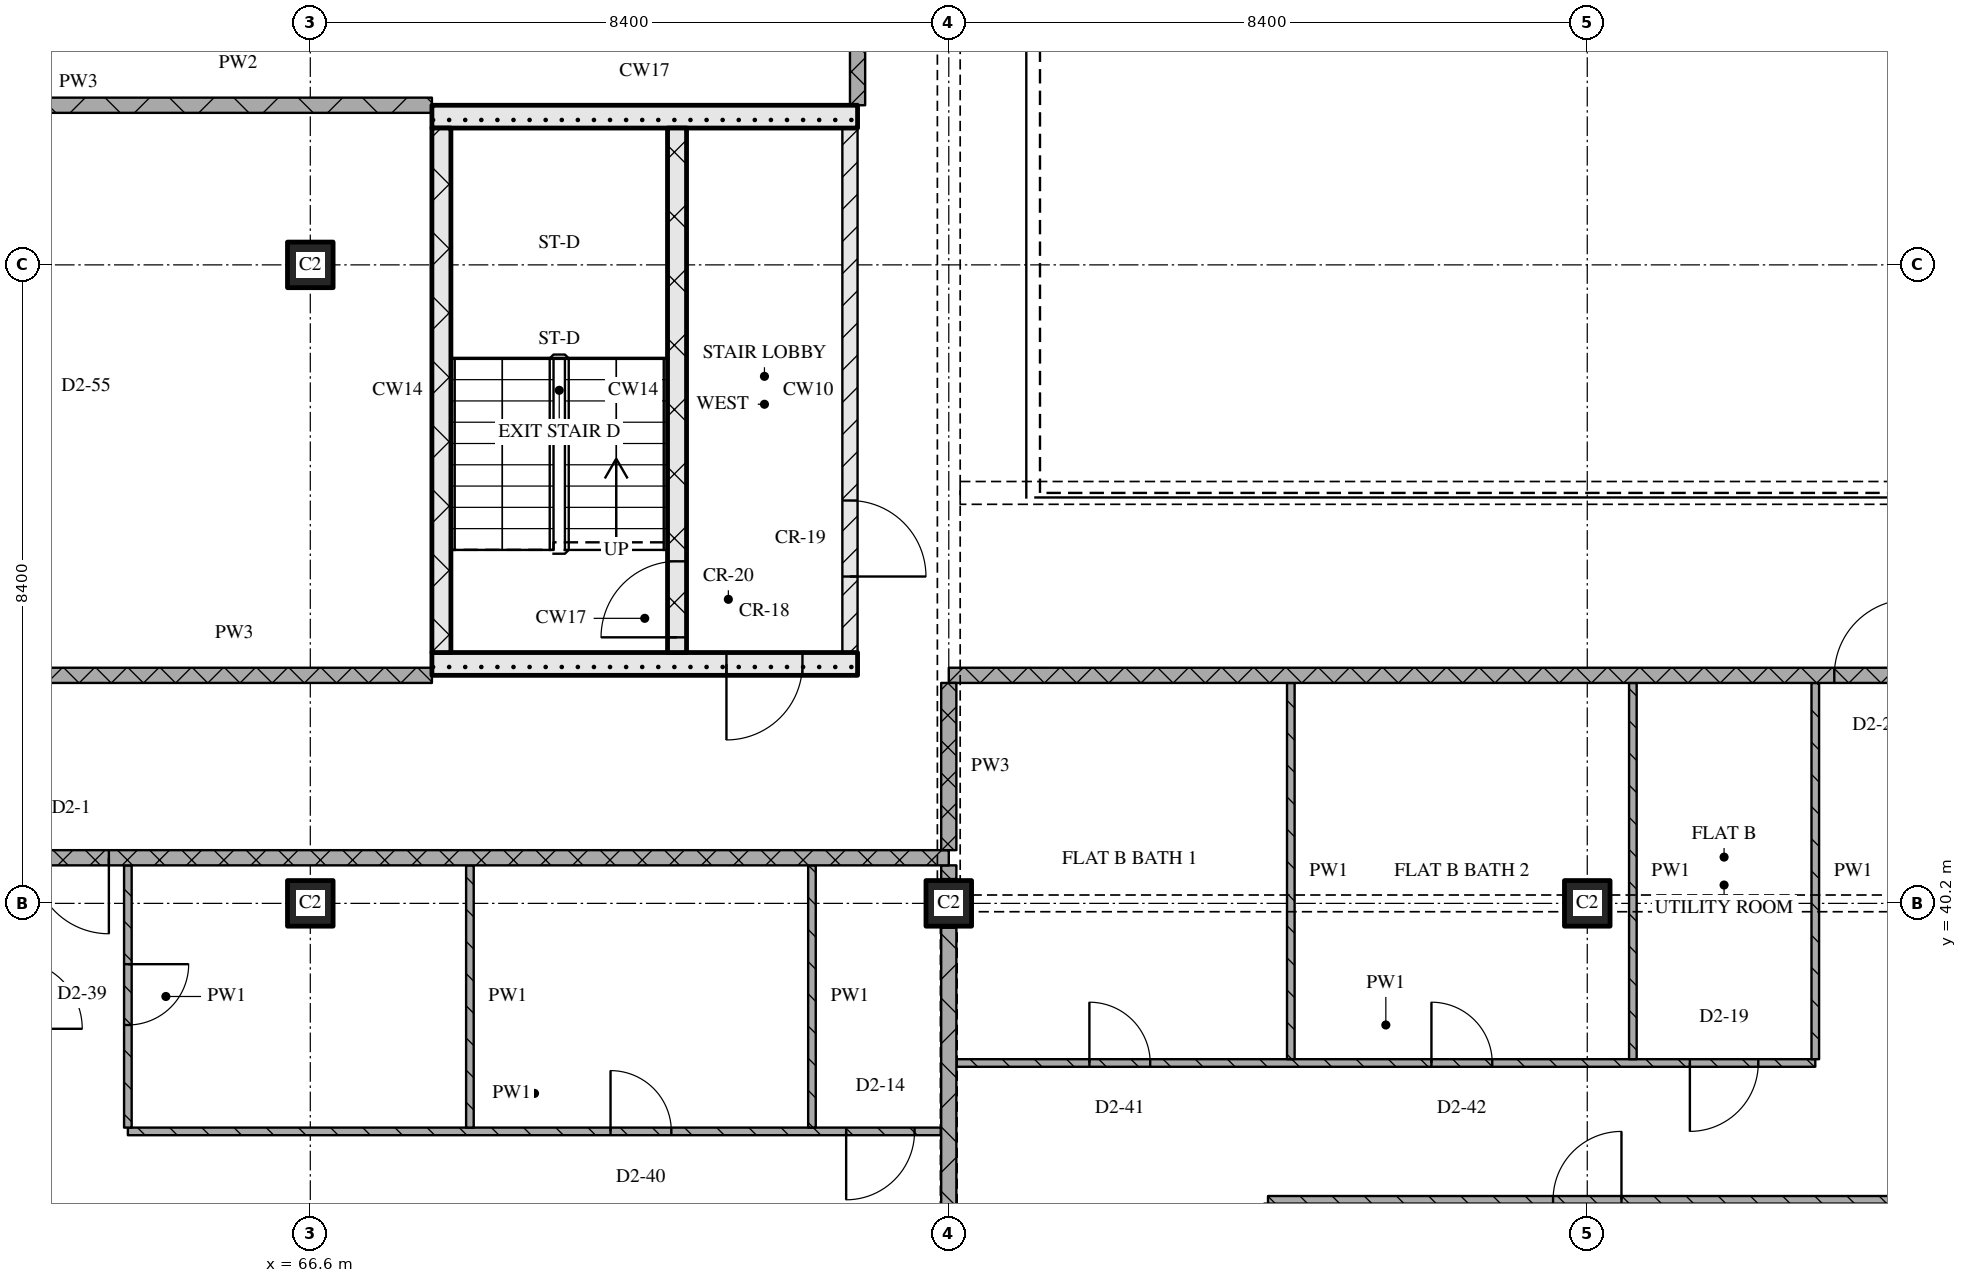
"""IFC4 building model, lengths in metres.
Left out: names, types, materials, properties, quantities, classifications, styles, units other than length and angle.
Written with IfcOpenShell. Run it as: python <this file> out.ifc"""

import sys

from ifc_helpers import new_model, si_unit, direction, frame, frame_2d, origin, origin_2d, place, context, subcontext, project, spatial, rectangle, extrude, element, fill, save


model = new_model("IFC4")
c1 = context("Model", 3, precision=1e-05, world=origin(), true_north=direction((0.0, 1.0)))
c2 = subcontext(c1, "Body", "Model", "MODEL_VIEW")
j1 = project(units=[si_unit("LENGTHUNIT", "METRE"), si_unit("PLANEANGLEUNIT", "RADIAN")], contexts=[c1])
p1 = place(None, origin())
s1 = spatial("IfcSite", under=j1, at=p1, CompositionType="ELEMENT")
p2 = place(p1, origin())
s2 = spatial("IfcBuilding", under=s1, at=p2, CompositionType="ELEMENT")
p3 = place(p2, frame((0.0, 0.0, 216.3)))
s3 = spatial("IfcBuildingStorey", under=s2, at=p3, CompositionType="ELEMENT", Elevation=216.3)
for number, where, z_axis, x_axis in (
    (1, (66.6, 40.2, 0.0), (0.0, 0.0, 1.0), (1.0, 0.0, 0.0)),
    (2, (66.6, 48.6, 0.0), (0.0, 0.0, 1.0), (1.0, 0.0, 0.0)),
    (3, (75.0, 40.2, 0.0), (0.0, 0.0, 1.0), (1.0, 0.0, 0.0)),
    (4, (83.4, 40.2, 0.0), (0.0, 0.0, 1.0), (1.0, 0.0, 0.0)),
):
    element("IfcColumn", number, at=place(p3, frame(where, z_axis=z_axis, x_axis=x_axis)), inside=s3, PredefinedType="COLUMN", context=c2, shape_type="SweptSolid", body=[
        extrude(rectangle(XDim=0.6, YDim=0.6, at=origin_2d()), origin(), (0.0, 0.0, 1.0), 3.6),
    ])
p4 = place(p3, frame((68.2, 43.35, 0.0), z_axis=(0.0, 0.0, 1.0), x_axis=(1.0, 0.0, 0.0)))
e5 = element("IfcWall", 5, at=p4, inside=s3, PredefinedType="SOLIDWALL", context=c2, shape_type="SweptSolid", body=[
    extrude(rectangle(XDim=5.6, YDim=0.3, at=frame_2d((2.8, 0.0))), origin(), (0.0, 0.0, 1.0), 3.32),
])
p5 = place(p4, frame((3.875, 0.0, 0.0)))
e6 = element("IfcOpeningElement", 6, at=p5, cuts=e5, PredefinedType="OPENING", context=c2, shape_type="SweptSolid", body=[
    extrude(rectangle(XDim=1.0, YDim=2.1, at=frame_2d((0.5, 1.05))), frame((0.0, 0.16, 0.0), z_axis=(0.0, -1.0, 0.0), x_axis=(1.0, 0.0, 0.0)), (0.0, 0.0, 1.0), 0.32),
])
p6 = place(p3, frame((68.325, 43.5, 0.0), z_axis=(0.0, 0.0, 1.0), x_axis=(0.0, 1.0, 0.0)))
e7 = element("IfcWall", 7, at=p6, inside=s3, PredefinedType="SOLIDWALL", context=c2, shape_type="SweptSolid", body=[
    extrude(rectangle(XDim=6.9, YDim=0.25, at=frame_2d((3.45, 0.0))), origin(), (0.0, 0.0, 1.0), 3.32),
])
p7 = place(p3, frame((71.425, 43.5, 0.0), z_axis=(0.0, 0.0, 1.0), x_axis=(0.0, 1.0, 0.0)))
e8 = element("IfcWall", 8, at=p7, inside=s3, PredefinedType="SOLIDWALL", context=c2, shape_type="SweptSolid", body=[
    extrude(rectangle(XDim=6.9, YDim=0.25, at=frame_2d((3.45, 0.0))), origin(), (0.0, 0.0, 1.0), 3.32),
])
p8 = place(p7, frame((0.2, 0.0, 0.0)))
e9 = element("IfcOpeningElement", 9, at=p8, cuts=e8, PredefinedType="OPENING", context=c2, shape_type="SweptSolid", body=[
    extrude(rectangle(XDim=1.0, YDim=2.1, at=frame_2d((0.5, 1.05))), frame((0.0, 0.135, 0.0), z_axis=(0.0, -1.0, 0.0), x_axis=(1.0, 0.0, 0.0)), (0.0, 0.0, 1.0), 0.27),
])
p9 = place(p3, frame((73.7, 43.5, 0.0), z_axis=(0.0, 0.0, 1.0), x_axis=(0.0, 1.0, 0.0)))
e10 = element("IfcWall", 10, at=p9, inside=s3, PredefinedType="PARTITIONING", context=c2, shape_type="SweptSolid", body=[
    extrude(rectangle(XDim=6.9, YDim=0.2, at=frame_2d((3.45, 0.0))), origin(), (0.0, 0.0, 1.0), 3.32),
])
p10 = place(p9, frame((1.0, 0.0, 0.0)))
e11 = element("IfcOpeningElement", 11, at=p10, cuts=e10, PredefinedType="OPENING", context=c2, shape_type="SweptSolid", body=[
    extrude(rectangle(XDim=1.0, YDim=2.1, at=frame_2d((0.5, 1.05))), frame((0.0, 0.11, 0.0), z_axis=(0.0, -1.0, 0.0), x_axis=(1.0, 0.0, 0.0)), (0.0, 0.0, 1.0), 0.22),
])
p11 = place(p3, frame((68.2, 50.55, 0.0), z_axis=(0.0, 0.0, 1.0), x_axis=(1.0, 0.0, 0.0)))
e12 = element("IfcWall", 12, at=p11, inside=s3, PredefinedType="SOLIDWALL", context=c2, shape_type="SweptSolid", body=[
    extrude(rectangle(XDim=5.6, YDim=0.3, at=frame_2d((2.8, 0.0))), origin(), (0.0, 0.0, 1.0), 3.32),
])
p12 = place(p3, frame((64.2, 37.2, 0.0), z_axis=(0.0, 0.0, 1.0), x_axis=(1.0, 0.0, 0.0)))
e13 = element("IfcWall", 13, at=p12, inside=s3, PredefinedType="PARTITIONING", context=c2, shape_type="SweptSolid", body=[
    extrude(rectangle(XDim=10.7, YDim=0.1, at=frame_2d((5.35, 0.0))), origin(), (0.0, 0.0, 1.0), 3.32),
])
p13 = place(p12, frame((6.35, 0.0, 0.0)))
e14 = element("IfcOpeningElement", 14, at=p13, cuts=e13, PredefinedType="OPENING", context=c2, shape_type="SweptSolid", body=[
    extrude(rectangle(XDim=0.8, YDim=2.1, at=frame_2d((0.4, 1.05))), frame((0.0, 0.06, 0.0), z_axis=(0.0, -1.0, 0.0), x_axis=(1.0, 0.0, 0.0)), (0.0, 0.0, 1.0), 0.12),
])
p14 = place(p12, frame((9.45, 0.0, 0.0)))
e15 = element("IfcOpeningElement", 15, at=p14, cuts=e13, PredefinedType="OPENING", context=c2, shape_type="SweptSolid", body=[
    extrude(rectangle(XDim=0.9, YDim=2.1, at=frame_2d((0.45, 1.05))), frame((0.0, 0.06, 0.0), z_axis=(0.0, -1.0, 0.0), x_axis=(1.0, 0.0, 0.0)), (0.0, 0.0, 1.0), 0.12),
])
p15 = place(p3, frame((75.1, 38.1, 0.0), z_axis=(0.0, 0.0, 1.0), x_axis=(1.0, 0.0, 0.0)))
e16 = element("IfcWall", 16, at=p15, inside=s3, PredefinedType="PARTITIONING", context=c2, shape_type="SweptSolid", body=[
    extrude(rectangle(XDim=11.3, YDim=0.1, at=frame_2d((5.65, 0.0))), origin(), (0.0, 0.0, 1.0), 3.32),
])
p16 = place(p15, frame((1.75, 0.0, 0.0)))
e17 = element("IfcOpeningElement", 17, at=p16, cuts=e16, PredefinedType="OPENING", context=c2, shape_type="SweptSolid", body=[
    extrude(rectangle(XDim=0.8, YDim=2.1, at=frame_2d((0.4, 1.05))), frame((0.0, 0.06, 0.0), z_axis=(0.0, -1.0, 0.0), x_axis=(1.0, 0.0, 0.0)), (0.0, 0.0, 1.0), 0.12),
])
p17 = place(p15, frame((6.25, 0.0, 0.0)))
e18 = element("IfcOpeningElement", 18, at=p17, cuts=e16, PredefinedType="OPENING", context=c2, shape_type="SweptSolid", body=[
    extrude(rectangle(XDim=0.8, YDim=2.1, at=frame_2d((0.4, 1.05))), frame((0.0, 0.06, 0.0), z_axis=(0.0, -1.0, 0.0), x_axis=(1.0, 0.0, 0.0)), (0.0, 0.0, 1.0), 0.12),
])
p18 = place(p15, frame((9.65, 0.0, 0.0)))
e19 = element("IfcOpeningElement", 19, at=p18, cuts=e16, PredefinedType="OPENING", context=c2, shape_type="SweptSolid", body=[
    extrude(rectangle(XDim=0.9, YDim=2.1, at=frame_2d((0.45, 1.05))), frame((0.0, 0.06, 0.0), z_axis=(0.0, -1.0, 0.0), x_axis=(1.0, 0.0, 0.0)), (0.0, 0.0, 1.0), 0.12),
])
p19 = place(p3, frame((75.0, 40.8, 0.0), z_axis=(0.0, 0.0, 1.0), x_axis=(-1.0, 0.0, 0.0)))
e20 = element("IfcWall", 20, at=p19, inside=s3, PredefinedType="PARTITIONING", context=c2, shape_type="SweptSolid", body=[
    extrude(rectangle(XDim=24.38, YDim=0.2, at=frame_2d((12.19, 0.0))), origin(), (0.0, 0.0, 1.0), 3.32),
])
p20 = place(p19, frame((11.05, 0.0, 0.0)))
e21 = element("IfcOpeningElement", 21, at=p20, cuts=e20, PredefinedType="OPENING", context=c2, shape_type="SweptSolid", body=[
    extrude(rectangle(XDim=1.0, YDim=2.1, at=frame_2d((0.5, 1.05))), frame((0.0, 0.11, 0.0), z_axis=(0.0, -1.0, 0.0), x_axis=(1.0, 0.0, 0.0)), (0.0, 0.0, 1.0), 0.22),
])
p21 = place(p3, frame((63.0, 43.2, 0.0), z_axis=(0.0, 0.0, 1.0), x_axis=(1.0, 0.0, 0.0)))
e22 = element("IfcWall", 22, at=p21, inside=s3, PredefinedType="PARTITIONING", context=c2, shape_type="SweptSolid", body=[
    extrude(rectangle(XDim=5.2, YDim=0.2, at=frame_2d((2.6, 0.0))), origin(), (0.0, 0.0, 1.0), 3.32),
])
p22 = place(p3, frame((100.2, 43.2, 0.0), z_axis=(0.0, 0.0, 1.0), x_axis=(-1.0, 0.0, 0.0)))
e23 = element("IfcWall", 23, at=p22, inside=s3, PredefinedType="PARTITIONING", context=c2, shape_type="SweptSolid", body=[
    extrude(rectangle(XDim=25.2, YDim=0.2, at=frame_2d((12.6, 0.0))), origin(), (0.0, 0.0, 1.0), 3.32),
])
p23 = place(p22, frame((12.55, 0.0, 0.0)))
e24 = element("IfcOpeningElement", 24, at=p23, cuts=e23, PredefinedType="OPENING", context=c2, shape_type="SweptSolid", body=[
    extrude(rectangle(XDim=1.0, YDim=2.1, at=frame_2d((0.5, 1.05))), frame((0.0, 0.11, 0.0), z_axis=(0.0, -1.0, 0.0), x_axis=(1.0, 0.0, 0.0)), (0.0, 0.0, 1.0), 0.22),
])
p24 = place(p3, frame((63.1, 50.7, 0.0), z_axis=(0.0, 0.0, 1.0), x_axis=(1.0, 0.0, 0.0)))
e25 = element("IfcWall", 25, at=p24, inside=s3, PredefinedType="PARTITIONING", context=c2, shape_type="SweptSolid", body=[
    extrude(rectangle(XDim=5.1, YDim=0.2, at=frame_2d((2.55, 0.0))), origin(), (0.0, 0.0, 1.0), 3.32),
])
p25 = place(p3, frame((64.2, 40.7, 0.0), z_axis=(0.0, 0.0, 1.0), x_axis=(0.0, -1.0, 0.0)))
e26 = element("IfcWall", 26, at=p25, inside=s3, PredefinedType="PARTITIONING", context=c2, shape_type="SweptSolid", body=[
    extrude(rectangle(XDim=3.45, YDim=0.1, at=frame_2d((1.725, 0.0))), origin(), (0.0, 0.0, 1.0), 3.32),
])
p26 = place(p25, frame((1.3, 0.0, 0.0)))
e27 = element("IfcOpeningElement", 27, at=p26, cuts=e26, PredefinedType="OPENING", context=c2, shape_type="SweptSolid", body=[
    extrude(rectangle(XDim=0.8, YDim=2.1, at=frame_2d((0.4, 1.05))), frame((0.0, 0.06, 0.0), z_axis=(0.0, -1.0, 0.0), x_axis=(1.0, 0.0, 0.0)), (0.0, 0.0, 1.0), 0.12),
])
for number, where, z_axis, x_axis in (
    (28, (68.7, 40.7, 0.0), (0.0, 0.0, 1.0), (0.0, -1.0, 0.0)),
    (29, (73.2, 40.7, 0.0), (0.0, 0.0, 1.0), (0.0, -1.0, 0.0)),
):
    element("IfcWall", number, at=place(p3, frame(where, z_axis=z_axis, x_axis=x_axis)), inside=s3, PredefinedType="PARTITIONING", context=c2, shape_type="SweptSolid", body=[
        extrude(rectangle(XDim=3.45, YDim=0.1, at=frame_2d((1.725, 0.0))), origin(), (0.0, 0.0, 1.0), 3.32),
    ])
p27 = place(p3, frame((73.8, 58.7, 0.0), z_axis=(0.0, 0.0, 1.0), x_axis=(0.0, -1.0, 0.0)))
e30 = element("IfcWall", 30, at=p27, inside=s3, PredefinedType="PARTITIONING", context=c2, shape_type="SweptSolid", body=[
    extrude(rectangle(XDim=8.0, YDim=0.2, at=frame_2d((4.0, 0.0))), origin(), (0.0, 0.0, 1.0), 3.32),
])
p28 = place(p27, frame((1.225, 0.0, 0.9)))
e31 = element("IfcOpeningElement", 31, at=p28, cuts=e30, PredefinedType="OPENING", context=c2, shape_type="SweptSolid", body=[
    extrude(rectangle(XDim=1.5, YDim=1.5, at=frame_2d((0.75, 0.75))), frame((0.0, 0.11, 0.0), z_axis=(0.0, -1.0, 0.0), x_axis=(1.0, 0.0, 0.0)), (0.0, 0.0, 1.0), 0.22),
])
p29 = place(p3, frame((75.0, 43.1, 0.0), z_axis=(0.0, 0.0, 1.0), x_axis=(0.0, -1.0, 0.0)))
e32 = element("IfcWall", 32, at=p29, inside=s3, PredefinedType="PARTITIONING", context=c2, shape_type="SweptSolid", body=[
    extrude(rectangle(XDim=2.2, YDim=0.2, at=frame_2d((1.1, 0.0))), origin(), (0.0, 0.0, 1.0), 2.53),
])
p30 = place(p3, frame((75.0, 39.88, 0.0), z_axis=(0.0, 0.0, 1.0), x_axis=(0.0, -1.0, 0.0)))
e33 = element("IfcWall", 33, at=p30, inside=s3, PredefinedType="PARTITIONING", context=c2, shape_type="SweptSolid", body=[
    extrude(rectangle(XDim=7.76, YDim=0.2, at=frame_2d((3.88, 0.0))), origin(), (0.0, 0.0, 1.0), 2.72),
])
p31 = place(p3, frame((75.0, 40.7, 0.0), z_axis=(0.0, 0.0, 1.0), x_axis=(0.0, -1.0, 0.0)))
e34 = element("IfcWall", 34, at=p31, inside=s3, PredefinedType="PARTITIONING", context=c2, shape_type="SweptSolid", body=[
    extrude(rectangle(XDim=0.18, YDim=0.2, at=frame_2d((0.09, 0.0))), origin(), (0.0, 0.0, 1.0), 3.32),
])
p32 = place(p3, frame((79.2, 36.25, 0.0), z_axis=(0.0, 0.0, 1.0), x_axis=(0.0, -1.0, 0.0)))
e35 = element("IfcWall", 35, at=p32, inside=s3, PredefinedType="PARTITIONING", context=c2, shape_type="SweptSolid", body=[
    extrude(rectangle(XDim=5.97, YDim=0.1, at=frame_2d((2.985, 0.0))), origin(), (0.0, 0.0, 1.0), 3.32),
])
for number, where, z_axis, x_axis in (
    (36, (79.5, 43.1, 0.0), (0.0, 0.0, 1.0), (0.0, -1.0, 0.0)),
    (37, (84.0, 43.1, 0.0), (0.0, 0.0, 1.0), (0.0, -1.0, 0.0)),
    (38, (86.4, 43.1, 0.0), (0.0, 0.0, 1.0), (0.0, -1.0, 0.0)),
):
    element("IfcWall", number, at=place(p3, frame(where, z_axis=z_axis, x_axis=x_axis)), inside=s3, PredefinedType="PARTITIONING", context=c2, shape_type="SweptSolid", body=[
        extrude(rectangle(XDim=4.95, YDim=0.1, at=frame_2d((2.475, 0.0))), origin(), (0.0, 0.0, 1.0), 3.32),
    ])
p33 = place(p3, frame((100.1, 36.3, 0.0), z_axis=(0.0, 0.0, 1.0), x_axis=(-1.0, 0.0, 0.0)))
e39 = element("IfcWall", 39, at=p33, inside=s3, PredefinedType="PARTITIONING", context=c2, shape_type="SweptSolid", body=[
    extrude(rectangle(XDim=20.9, YDim=0.1, at=frame_2d((10.45, 0.0))), origin(), (0.0, 0.0, 1.0), 3.32),
])
p34 = place(p33, frame((1.55, 0.0, 0.0)))
e40 = element("IfcOpeningElement", 40, at=p34, cuts=e39, PredefinedType="OPENING", context=c2, shape_type="SweptSolid", body=[
    extrude(rectangle(XDim=0.9, YDim=2.1, at=frame_2d((0.45, 1.05))), frame((0.0, 0.06, 0.0), z_axis=(0.0, -1.0, 0.0), x_axis=(1.0, 0.0, 0.0)), (0.0, 0.0, 1.0), 0.12),
])
p35 = place(p33, frame((7.85, 0.0, 0.0)))
e41 = element("IfcOpeningElement", 41, at=p35, cuts=e39, PredefinedType="OPENING", context=c2, shape_type="SweptSolid", body=[
    extrude(rectangle(XDim=0.9, YDim=2.1, at=frame_2d((0.45, 1.05))), frame((0.0, 0.06, 0.0), z_axis=(0.0, -1.0, 0.0), x_axis=(1.0, 0.0, 0.0)), (0.0, 0.0, 1.0), 0.12),
])
p36 = place(p33, frame((16.25, 0.0, 0.0)))
e42 = element("IfcOpeningElement", 42, at=p36, cuts=e39, PredefinedType="OPENING", context=c2, shape_type="SweptSolid", body=[
    extrude(rectangle(XDim=0.9, YDim=2.1, at=frame_2d((0.45, 1.05))), frame((0.0, 0.06, 0.0), z_axis=(0.0, -1.0, 0.0), x_axis=(1.0, 0.0, 0.0)), (0.0, 0.0, 1.0), 0.12),
])
p37 = place(p5, origin())
e43 = element("IfcDoor", 43, at=p37, inside=s3, OperationType="SINGLE_SWING_RIGHT", PredefinedType="DOOR", context=c2, shape_type="SweptSolid", body=[
    extrude(rectangle(XDim=1.0, YDim=2.1, at=frame_2d((0.5, 1.05))), frame((0.0, 0.025, 0.0), z_axis=(0.0, -1.0, 0.0), x_axis=(1.0, 0.0, 0.0)), (0.0, 0.0, 1.0), 0.05),
])
fill(e6, e43)
p38 = place(p8, origin())
e44 = element("IfcDoor", 44, at=p38, inside=s3, OperationType="SINGLE_SWING_LEFT", PredefinedType="DOOR", context=c2, shape_type="SweptSolid", body=[
    extrude(rectangle(XDim=1.0, YDim=2.1, at=frame_2d((0.5, 1.05))), frame((0.0, 0.025, 0.0), z_axis=(0.0, -1.0, 0.0), x_axis=(1.0, 0.0, 0.0)), (0.0, 0.0, 1.0), 0.05),
])
fill(e9, e44)
p39 = place(p10, origin())
e45 = element("IfcDoor", 45, at=p39, inside=s3, OperationType="SINGLE_SWING_RIGHT", PredefinedType="DOOR", context=c2, shape_type="SweptSolid", body=[
    extrude(rectangle(XDim=1.0, YDim=2.1, at=frame_2d((0.5, 1.05))), frame((0.0, 0.025, 0.0), z_axis=(0.0, -1.0, 0.0), x_axis=(1.0, 0.0, 0.0)), (0.0, 0.0, 1.0), 0.05),
])
fill(e11, e45)
p40 = place(p13, origin())
e46 = element("IfcDoor", 46, at=p40, inside=s3, OperationType="SINGLE_SWING_LEFT", PredefinedType="DOOR", context=c2, shape_type="SweptSolid", body=[
    extrude(rectangle(XDim=0.8, YDim=2.1, at=frame_2d((0.4, 1.05))), frame((0.0, 0.025, 0.0), z_axis=(0.0, -1.0, 0.0), x_axis=(1.0, 0.0, 0.0)), (0.0, 0.0, 1.0), 0.05),
])
fill(e14, e46)
p41 = place(p14, origin())
e47 = element("IfcDoor", 47, at=p41, inside=s3, OperationType="SINGLE_SWING_RIGHT", PredefinedType="DOOR", context=c2, shape_type="SweptSolid", body=[
    extrude(rectangle(XDim=0.9, YDim=2.1, at=frame_2d((0.45, 1.05))), frame((0.0, 0.025, 0.0), z_axis=(0.0, -1.0, 0.0), x_axis=(1.0, 0.0, 0.0)), (0.0, 0.0, 1.0), 0.05),
])
fill(e15, e47)
p42 = place(p16, origin())
e48 = element("IfcDoor", 48, at=p42, inside=s3, OperationType="SINGLE_SWING_LEFT", PredefinedType="DOOR", context=c2, shape_type="SweptSolid", body=[
    extrude(rectangle(XDim=0.8, YDim=2.1, at=frame_2d((0.4, 1.05))), frame((0.0, 0.025, 0.0), z_axis=(0.0, -1.0, 0.0), x_axis=(1.0, 0.0, 0.0)), (0.0, 0.0, 1.0), 0.05),
])
fill(e17, e48)
p43 = place(p17, origin())
e49 = element("IfcDoor", 49, at=p43, inside=s3, OperationType="SINGLE_SWING_LEFT", PredefinedType="DOOR", context=c2, shape_type="SweptSolid", body=[
    extrude(rectangle(XDim=0.8, YDim=2.1, at=frame_2d((0.4, 1.05))), frame((0.0, 0.025, 0.0), z_axis=(0.0, -1.0, 0.0), x_axis=(1.0, 0.0, 0.0)), (0.0, 0.0, 1.0), 0.05),
])
fill(e18, e49)
p44 = place(p18, origin())
e50 = element("IfcDoor", 50, at=p44, inside=s3, OperationType="SINGLE_SWING_RIGHT", PredefinedType="DOOR", context=c2, shape_type="SweptSolid", body=[
    extrude(rectangle(XDim=0.9, YDim=2.1, at=frame_2d((0.45, 1.05))), frame((0.0, 0.025, 0.0), z_axis=(0.0, -1.0, 0.0), x_axis=(1.0, 0.0, 0.0)), (0.0, 0.0, 1.0), 0.05),
])
fill(e19, e50)
p45 = place(p20, origin())
e51 = element("IfcDoor", 51, at=p45, inside=s3, OperationType="SINGLE_SWING_LEFT", PredefinedType="DOOR", context=c2, shape_type="SweptSolid", body=[
    extrude(rectangle(XDim=1.0, YDim=2.1, at=frame_2d((0.5, 1.05))), frame((0.0, 0.025, 0.0), z_axis=(0.0, -1.0, 0.0), x_axis=(1.0, 0.0, 0.0)), (0.0, 0.0, 1.0), 0.05),
])
fill(e21, e51)
p46 = place(p23, origin())
e52 = element("IfcDoor", 52, at=p46, inside=s3, OperationType="SINGLE_SWING_RIGHT", PredefinedType="DOOR", context=c2, shape_type="SweptSolid", body=[
    extrude(rectangle(XDim=1.0, YDim=2.1, at=frame_2d((0.5, 1.05))), frame((0.0, 0.025, 0.0), z_axis=(0.0, -1.0, 0.0), x_axis=(1.0, 0.0, 0.0)), (0.0, 0.0, 1.0), 0.05),
])
fill(e24, e52)
p47 = place(p26, origin())
e53 = element("IfcDoor", 53, at=p47, inside=s3, OperationType="SINGLE_SWING_LEFT", PredefinedType="DOOR", context=c2, shape_type="SweptSolid", body=[
    extrude(rectangle(XDim=0.8, YDim=2.1, at=frame_2d((0.4, 1.05))), frame((0.0, 0.025, 0.0), z_axis=(0.0, -1.0, 0.0), x_axis=(1.0, 0.0, 0.0)), (0.0, 0.0, 1.0), 0.05),
])
fill(e27, e53)
p48 = place(p36, origin())
e54 = element("IfcDoor", 54, at=p48, inside=s3, OperationType="SINGLE_SWING_RIGHT", PredefinedType="DOOR", context=c2, shape_type="SweptSolid", body=[
    extrude(rectangle(XDim=0.9, YDim=2.1, at=frame_2d((0.45, 1.05))), frame((0.0, 0.025, 0.0), z_axis=(0.0, -1.0, 0.0), x_axis=(1.0, 0.0, 0.0)), (0.0, 0.0, 1.0), 0.05),
])
fill(e42, e54)
save(model, sys.argv[1])
